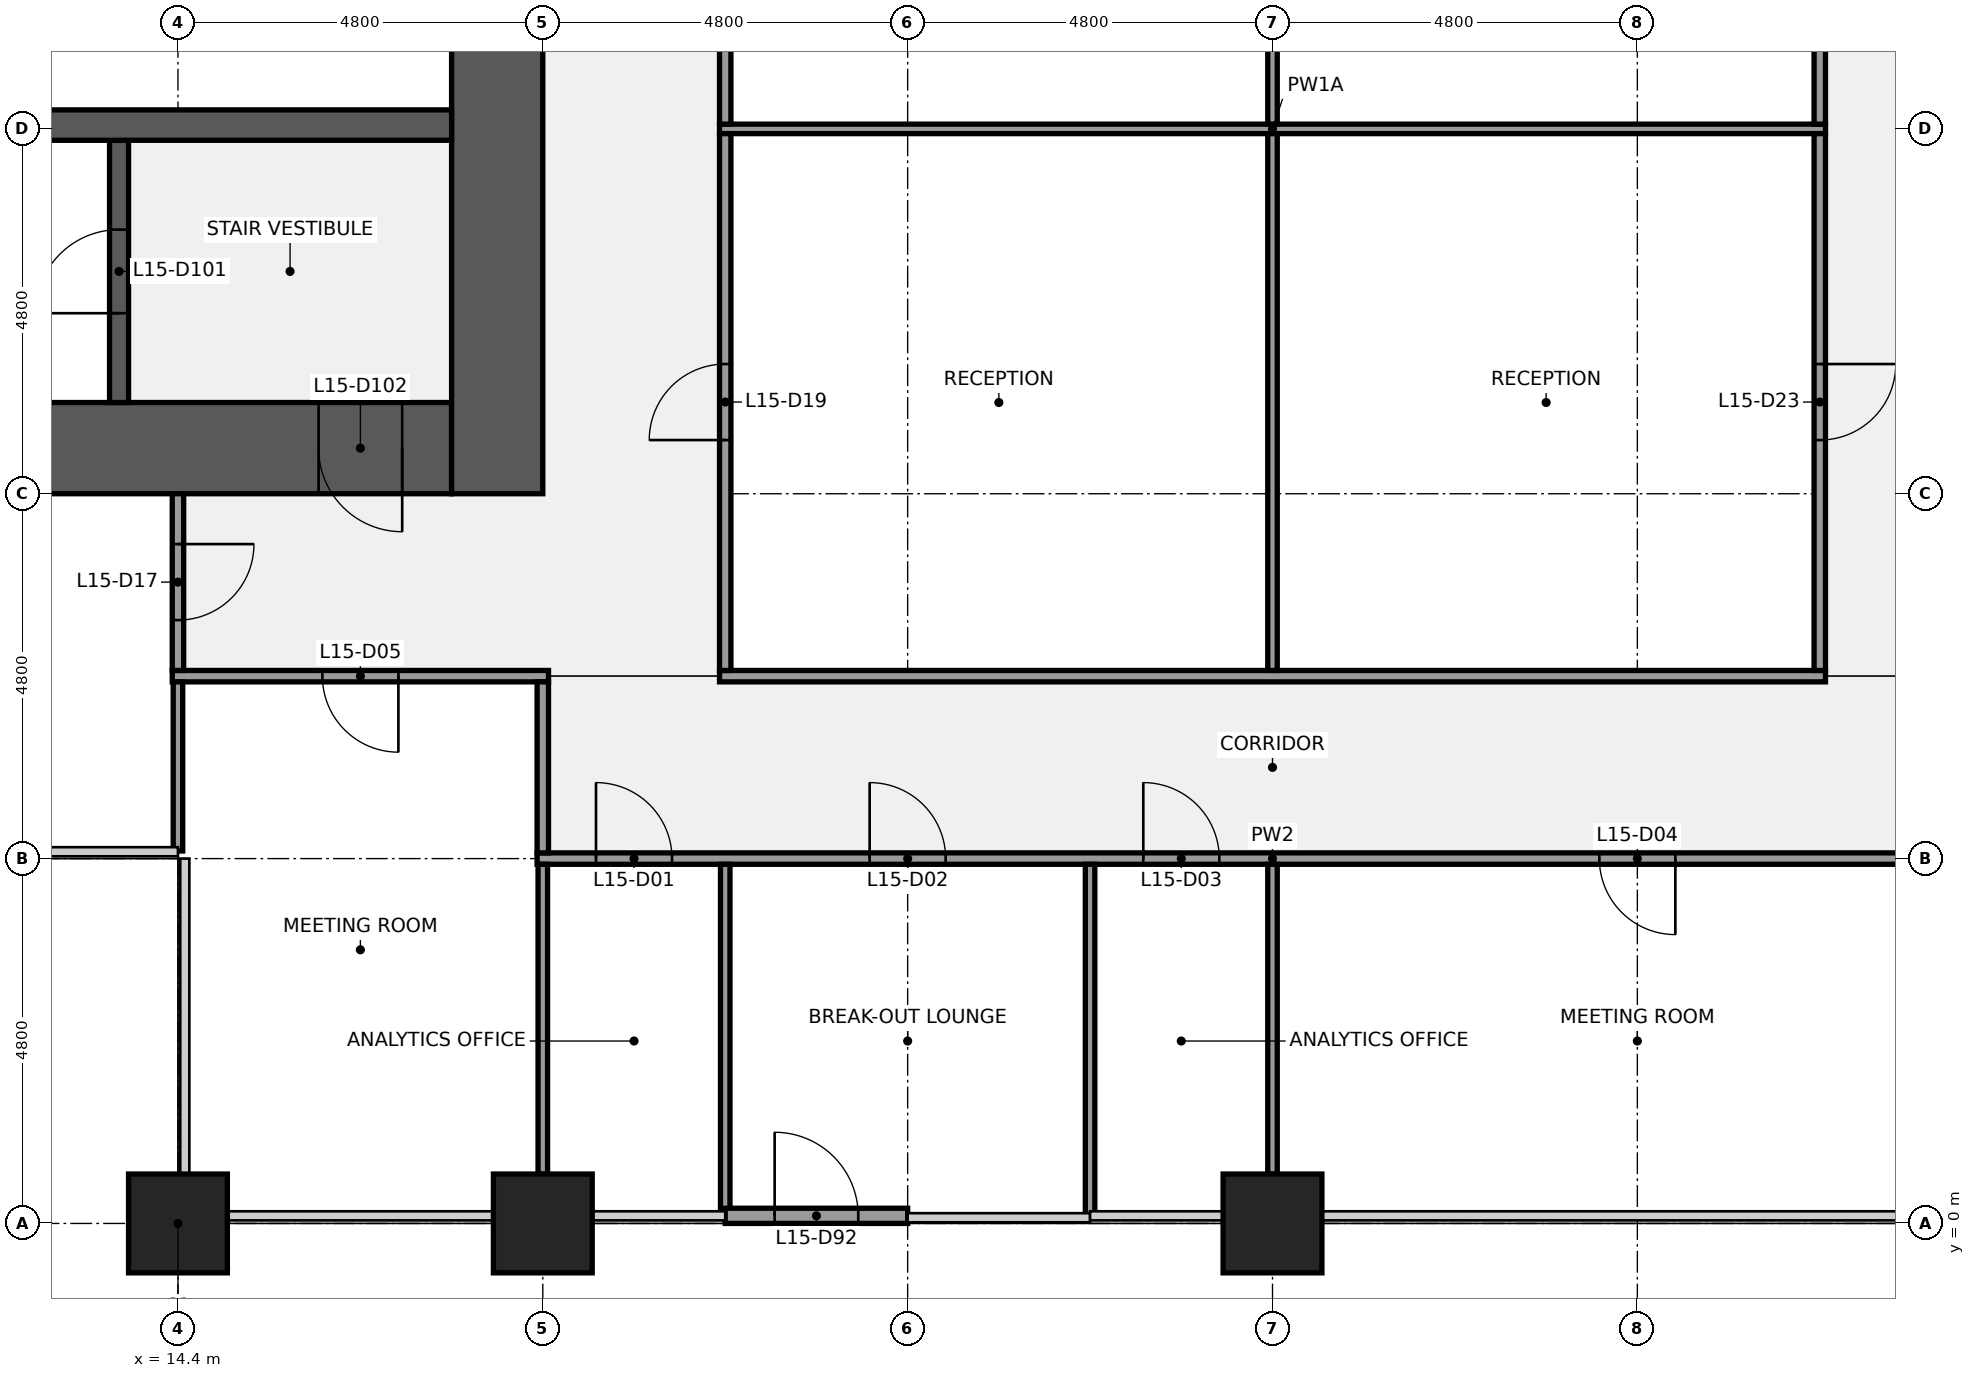
"""IFC4 building model, lengths in metres.
Left out: names, types, materials, properties, quantities, classifications, styles, units other than length and angle.
Written with IfcOpenShell. Run it as: python <this file> out.ifc"""

import sys

from ifc_helpers import new_model, si_unit, direction, frame, frame_2d, origin, origin_2d, place, context, subcontext, project, spatial, rectangle, extrude, element, fill, save


model = new_model("IFC4")
c1 = context("Model", 3, precision=1e-05, world=origin(), true_north=direction((0.0, 1.0)))
c2 = subcontext(c1, "Body", "Model", "MODEL_VIEW")
j1 = project(units=[si_unit("LENGTHUNIT", "METRE"), si_unit("PLANEANGLEUNIT", "RADIAN")], contexts=[c1])
p1 = place(None, origin())
s1 = spatial("IfcSite", under=j1, at=p1, CompositionType="ELEMENT")
p2 = place(p1, origin())
s2 = spatial("IfcBuilding", under=s1, at=p2, CompositionType="ELEMENT")
p3 = place(p2, frame((0.0, 0.0, 71.0)))
s3 = spatial("IfcBuildingStorey", under=s2, at=p3, CompositionType="ELEMENT", Elevation=71.0)
for number, where, z_axis, x_axis in (
    (1, (14.4, 0.0, 0.0), (0.0, 0.0, 1.0), (1.0, 0.0, 0.0)),
    (2, (19.2, 0.0, 0.0), (0.0, 0.0, 1.0), (1.0, 0.0, 0.0)),
    (3, (28.8, 0.0, 0.0), (0.0, 0.0, 1.0), (1.0, 0.0, 0.0)),
):
    element("IfcColumn", number, at=place(p3, frame(where, z_axis=z_axis, x_axis=x_axis)), inside=s3, PredefinedType="COLUMN", context=c2, shape_type="SweptSolid", body=[
        extrude(rectangle(XDim=1.3, YDim=1.3, at=origin_2d()), origin(), (0.0, 0.0, 1.0), 4.0),
    ])
p4 = place(p3, frame((18.0, 10.2, 0.0), z_axis=(0.0, 0.0, 1.0), x_axis=(-1.0, 0.0, 0.0)))
e4 = element("IfcWall", 4, at=p4, inside=s3, PredefinedType="SHEAR", context=c2, shape_type="SweptSolid", body=[
    extrude(rectangle(XDim=13.2, YDim=1.2, at=frame_2d((6.6, 0.0))), origin(), (0.0, 0.0, 1.0), 3.84),
])
p5 = place(p4, frame((0.65, 0.0, 0.0)))
e5 = element("IfcOpeningElement", 5, at=p5, cuts=e4, PredefinedType="OPENING", context=c2, shape_type="SweptSolid", body=[
    extrude(rectangle(XDim=1.1, YDim=2.1, at=frame_2d((0.55, 1.05))), frame((0.0, 0.61, 0.0), z_axis=(0.0, -1.0, 0.0), x_axis=(1.0, 0.0, 0.0)), (0.0, 0.0, 1.0), 1.22),
])
p6 = place(p3, frame((18.6, 38.4, 0.0), z_axis=(0.0, 0.0, 1.0), x_axis=(0.0, -1.0, 0.0)))
e6 = element("IfcWall", 6, at=p6, inside=s3, PredefinedType="SHEAR", context=c2, shape_type="SweptSolid", body=[
    extrude(rectangle(XDim=28.8, YDim=1.2, at=frame_2d((14.4, 0.0))), origin(), (0.0, 0.0, 1.0), 3.84),
])
p7 = place(p6, frame((18.3, 0.0, 0.0)))
e7 = element("IfcOpeningElement", 7, at=p7, cuts=e6, PredefinedType="OPENING", context=c2, shape_type="SweptSolid", body=[
    extrude(rectangle(XDim=1.8, YDim=2.1, at=frame_2d((0.9, 1.05))), frame((0.0, 0.61, 0.0), z_axis=(0.0, -1.0, 0.0), x_axis=(1.0, 0.0, 0.0)), (0.0, 0.0, 1.0), 1.22),
])
p8 = place(p6, frame((8.7, 0.0, 0.0)))
e8 = element("IfcOpeningElement", 8, at=p8, cuts=e6, PredefinedType="OPENING", context=c2, shape_type="SweptSolid", body=[
    extrude(rectangle(XDim=1.8, YDim=2.1, at=frame_2d((0.9, 1.05))), frame((0.0, 0.61, 0.0), z_axis=(0.0, -1.0, 0.0), x_axis=(1.0, 0.0, 0.0)), (0.0, 0.0, 1.0), 1.22),
])
p9 = place(p3, frame((13.625, 10.8, 0.0), z_axis=(0.0, 0.0, 1.0), x_axis=(0.0, 1.0, 0.0)))
e9 = element("IfcWall", 9, at=p9, inside=s3, PredefinedType="SHEAR", context=c2, shape_type="SweptSolid", body=[
    extrude(rectangle(XDim=3.45, YDim=0.25, at=frame_2d((1.725, 0.0))), origin(), (0.0, 0.0, 1.0), 3.84),
])
p10 = place(p9, frame((1.175, 0.0, 0.0)))
e10 = element("IfcOpeningElement", 10, at=p10, cuts=e9, PredefinedType="OPENING", context=c2, shape_type="SweptSolid", body=[
    extrude(rectangle(XDim=1.1, YDim=2.1, at=frame_2d((0.55, 1.05))), frame((0.0, 0.135, 0.0), z_axis=(0.0, -1.0, 0.0), x_axis=(1.0, 0.0, 0.0)), (0.0, 0.0, 1.0), 0.27),
])
p11 = place(p3, frame((1.2, 14.45, 0.0), z_axis=(0.0, 0.0, 1.0), x_axis=(1.0, 0.0, 0.0)))
e11 = element("IfcWall", 11, at=p11, inside=s3, PredefinedType="SHEAR", context=c2, shape_type="SweptSolid", body=[
    extrude(rectangle(XDim=16.8, YDim=0.4, at=frame_2d((8.4, 0.0))), origin(), (0.0, 0.0, 1.0), 3.84),
])
p12 = place(p3, frame((19.125, 4.8, 0.0), z_axis=(0.0, 0.0, 1.0), x_axis=(1.0, 0.0, 0.0)))
e12 = element("IfcWall", 12, at=p12, inside=s3, PredefinedType="PARTITIONING", context=c2, shape_type="SweptSolid", body=[
    extrude(rectangle(XDim=19.35, YDim=0.15, at=frame_2d((9.675, 0.0))), origin(), (0.0, 0.0, 1.0), 2.87),
])
p13 = place(p12, frame((0.775, 0.0, 0.0)))
e13 = element("IfcOpeningElement", 13, at=p13, cuts=e12, PredefinedType="OPENING", context=c2, shape_type="SweptSolid", body=[
    extrude(rectangle(XDim=1.0, YDim=2.1, at=frame_2d((0.5, 1.05))), frame((0.0, 0.085, 0.0), z_axis=(0.0, -1.0, 0.0), x_axis=(1.0, 0.0, 0.0)), (0.0, 0.0, 1.0), 0.17),
])
p14 = place(p12, frame((4.375, 0.0, 0.0)))
e14 = element("IfcOpeningElement", 14, at=p14, cuts=e12, PredefinedType="OPENING", context=c2, shape_type="SweptSolid", body=[
    extrude(rectangle(XDim=1.0, YDim=2.1, at=frame_2d((0.5, 1.05))), frame((0.0, 0.085, 0.0), z_axis=(0.0, -1.0, 0.0), x_axis=(1.0, 0.0, 0.0)), (0.0, 0.0, 1.0), 0.17),
])
p15 = place(p12, frame((7.975, 0.0, 0.0)))
e15 = element("IfcOpeningElement", 15, at=p15, cuts=e12, PredefinedType="OPENING", context=c2, shape_type="SweptSolid", body=[
    extrude(rectangle(XDim=1.0, YDim=2.1, at=frame_2d((0.5, 1.05))), frame((0.0, 0.085, 0.0), z_axis=(0.0, -1.0, 0.0), x_axis=(1.0, 0.0, 0.0)), (0.0, 0.0, 1.0), 0.17),
])
p16 = place(p12, frame((13.975, 0.0, 0.0)))
e16 = element("IfcOpeningElement", 16, at=p16, cuts=e12, PredefinedType="OPENING", context=c2, shape_type="SweptSolid", body=[
    extrude(rectangle(XDim=1.0, YDim=2.1, at=frame_2d((0.5, 1.05))), frame((0.0, 0.085, 0.0), z_axis=(0.0, -1.0, 0.0), x_axis=(1.0, 0.0, 0.0)), (0.0, 0.0, 1.0), 0.17),
])
p17 = place(p3, frame((14.325, 7.2, 0.0), z_axis=(0.0, 0.0, 1.0), x_axis=(1.0, 0.0, 0.0)))
e17 = element("IfcWall", 17, at=p17, inside=s3, PredefinedType="PARTITIONING", context=c2, shape_type="SweptSolid", body=[
    extrude(rectangle(XDim=4.95, YDim=0.15, at=frame_2d((2.475, 0.0))), origin(), (0.0, 0.0, 1.0), 2.87),
])
p18 = place(p17, frame((1.975, 0.0, 0.0)))
e18 = element("IfcOpeningElement", 18, at=p18, cuts=e17, PredefinedType="OPENING", context=c2, shape_type="SweptSolid", body=[
    extrude(rectangle(XDim=1.0, YDim=2.1, at=frame_2d((0.5, 1.05))), frame((0.0, 0.085, 0.0), z_axis=(0.0, -1.0, 0.0), x_axis=(1.0, 0.0, 0.0)), (0.0, 0.0, 1.0), 0.17),
])
p19 = place(p3, frame((21.525, 7.2, 0.0), z_axis=(0.0, 0.0, 1.0), x_axis=(1.0, 0.0, 0.0)))
e19 = element("IfcWall", 19, at=p19, inside=s3, PredefinedType="PARTITIONING", context=c2, shape_type="SweptSolid", body=[
    extrude(rectangle(XDim=14.55, YDim=0.15, at=frame_2d((7.275, 0.0))), origin(), (0.0, 0.0, 1.0), 2.87),
])
p20 = place(p3, frame((21.525, 14.4, 0.0), z_axis=(0.0, 0.0, 1.0), x_axis=(1.0, 0.0, 0.0)))
e20 = element("IfcWall", 20, at=p20, inside=s3, PredefinedType="PARTITIONING", context=c2, shape_type="SweptSolid", body=[
    extrude(rectangle(XDim=14.55, YDim=0.125, at=frame_2d((7.275, 0.0))), origin(), (0.0, 0.0, 1.0), 2.87),
])
p21 = place(p3, frame((14.4, 4.9, 0.0), z_axis=(0.0, 0.0, 1.0), x_axis=(0.0, 1.0, 0.0)))
e21 = element("IfcWall", 21, at=p21, inside=s3, PredefinedType="PARTITIONING", context=c2, shape_type="SweptSolid", body=[
    extrude(rectangle(XDim=2.225, YDim=0.125, at=frame_2d((1.113, 0.0))), origin(), (0.0, 0.0, 1.0), 2.87),
])
p22 = place(p3, frame((14.4, 7.275, 0.0), z_axis=(0.0, 0.0, 1.0), x_axis=(0.0, 1.0, 0.0)))
e22 = element("IfcWall", 22, at=p22, inside=s3, PredefinedType="PARTITIONING", context=c2, shape_type="SweptSolid", body=[
    extrude(rectangle(XDim=2.325, YDim=0.15, at=frame_2d((1.163, 0.0))), origin(), (0.0, 0.0, 1.0), 2.87),
])
p23 = place(p22, frame((0.663, 0.0, 0.0)))
e23 = element("IfcOpeningElement", 23, at=p23, cuts=e22, PredefinedType="OPENING", context=c2, shape_type="SweptSolid", body=[
    extrude(rectangle(XDim=1.0, YDim=2.1, at=frame_2d((0.5, 1.05))), frame((0.0, 0.085, 0.0), z_axis=(0.0, -1.0, 0.0), x_axis=(1.0, 0.0, 0.0)), (0.0, 0.0, 1.0), 0.17),
])
p24 = place(p3, frame((19.2, 0.65, 0.0), z_axis=(0.0, 0.0, 1.0), x_axis=(0.0, 1.0, 0.0)))
e24 = element("IfcWall", 24, at=p24, inside=s3, PredefinedType="PARTITIONING", context=c2, shape_type="SweptSolid", body=[
    extrude(rectangle(XDim=4.075, YDim=0.125, at=frame_2d((2.038, 0.0))), origin(), (0.0, 0.0, 1.0), 2.87),
])
p25 = place(p3, frame((19.2, 4.875, 0.0), z_axis=(0.0, 0.0, 1.0), x_axis=(0.0, 1.0, 0.0)))
e25 = element("IfcWall", 25, at=p25, inside=s3, PredefinedType="PARTITIONING", context=c2, shape_type="SweptSolid", body=[
    extrude(rectangle(XDim=2.25, YDim=0.15, at=frame_2d((1.125, 0.0))), origin(), (0.0, 0.0, 1.0), 2.87),
])
p26 = place(p3, frame((21.6, 0.1, 0.0), z_axis=(0.0, 0.0, 1.0), x_axis=(0.0, 1.0, 0.0)))
e26 = element("IfcWall", 26, at=p26, inside=s3, PredefinedType="PARTITIONING", context=c2, shape_type="SweptSolid", body=[
    extrude(rectangle(XDim=4.625, YDim=0.125, at=frame_2d((2.312, 0.0))), origin(), (0.0, 0.0, 1.0), 2.87),
])
p27 = place(p3, frame((21.6, 7.275, 0.0), z_axis=(0.0, 0.0, 1.0), x_axis=(0.0, 1.0, 0.0)))
e27 = element("IfcWall", 27, at=p27, inside=s3, PredefinedType="PARTITIONING", context=c2, shape_type="SweptSolid", body=[
    extrude(rectangle(XDim=7.062, YDim=0.15, at=frame_2d((3.531, 0.0))), origin(), (0.0, 0.0, 1.0), 2.87),
])
p28 = place(p27, frame((3.031, 0.0, 0.0)))
e28 = element("IfcOpeningElement", 28, at=p28, cuts=e27, PredefinedType="OPENING", context=c2, shape_type="SweptSolid", body=[
    extrude(rectangle(XDim=1.0, YDim=2.1, at=frame_2d((0.5, 1.05))), frame((0.0, 0.085, 0.0), z_axis=(0.0, -1.0, 0.0), x_axis=(1.0, 0.0, 0.0)), (0.0, 0.0, 1.0), 0.17),
])
p29 = place(p3, frame((21.6, 14.462, 0.0), z_axis=(0.0, 0.0, 1.0), x_axis=(0.0, 1.0, 0.0)))
e29 = element("IfcWall", 29, at=p29, inside=s3, PredefinedType="PARTITIONING", context=c2, shape_type="SweptSolid", body=[
    extrude(rectangle(XDim=7.075, YDim=0.15, at=frame_2d((3.538, 0.0))), origin(), (0.0, 0.0, 1.0), 2.87),
])
p30 = place(p29, frame((3.038, 0.0, 0.0)))
e30 = element("IfcOpeningElement", 30, at=p30, cuts=e29, PredefinedType="OPENING", context=c2, shape_type="SweptSolid", body=[
    extrude(rectangle(XDim=1.0, YDim=2.1, at=frame_2d((0.5, 1.05))), frame((0.0, 0.085, 0.0), z_axis=(0.0, -1.0, 0.0), x_axis=(1.0, 0.0, 0.0)), (0.0, 0.0, 1.0), 0.17),
])
p31 = place(p3, frame((26.4, 0.1, 0.0), z_axis=(0.0, 0.0, 1.0), x_axis=(0.0, 1.0, 0.0)))
e31 = element("IfcWall", 31, at=p31, inside=s3, PredefinedType="PARTITIONING", context=c2, shape_type="SweptSolid", body=[
    extrude(rectangle(XDim=4.625, YDim=0.125, at=frame_2d((2.312, 0.0))), origin(), (0.0, 0.0, 1.0), 2.87),
])
p32 = place(p3, frame((28.8, 0.65, 0.0), z_axis=(0.0, 0.0, 1.0), x_axis=(0.0, 1.0, 0.0)))
e32 = element("IfcWall", 32, at=p32, inside=s3, PredefinedType="PARTITIONING", context=c2, shape_type="SweptSolid", body=[
    extrude(rectangle(XDim=4.075, YDim=0.125, at=frame_2d((2.038, 0.0))), origin(), (0.0, 0.0, 1.0), 2.87),
])
p33 = place(p3, frame((28.8, 7.275, 0.0), z_axis=(0.0, 0.0, 1.0), x_axis=(0.0, 1.0, 0.0)))
e33 = element("IfcWall", 33, at=p33, inside=s3, PredefinedType="PARTITIONING", context=c2, shape_type="SweptSolid", body=[
    extrude(rectangle(XDim=7.062, YDim=0.125, at=frame_2d((3.531, 0.0))), origin(), (0.0, 0.0, 1.0), 2.87),
])
p34 = place(p3, frame((28.8, 14.462, 0.0), z_axis=(0.0, 0.0, 1.0), x_axis=(0.0, 1.0, 0.0)))
e34 = element("IfcWall", 34, at=p34, inside=s3, PredefinedType="PARTITIONING", context=c2, shape_type="SweptSolid", body=[
    extrude(rectangle(XDim=7.075, YDim=0.125, at=frame_2d((3.538, 0.0))), origin(), (0.0, 0.0, 1.0), 2.87),
])
p35 = place(p3, frame((36.0, 7.275, 0.0), z_axis=(0.0, 0.0, 1.0), x_axis=(0.0, 1.0, 0.0)))
e35 = element("IfcWall", 35, at=p35, inside=s3, PredefinedType="PARTITIONING", context=c2, shape_type="SweptSolid", body=[
    extrude(rectangle(XDim=7.062, YDim=0.15, at=frame_2d((3.531, 0.0))), origin(), (0.0, 0.0, 1.0), 2.87),
])
p36 = place(p35, frame((3.031, 0.0, 0.0)))
e36 = element("IfcOpeningElement", 36, at=p36, cuts=e35, PredefinedType="OPENING", context=c2, shape_type="SweptSolid", body=[
    extrude(rectangle(XDim=1.0, YDim=2.1, at=frame_2d((0.5, 1.05))), frame((0.0, 0.085, 0.0), z_axis=(0.0, -1.0, 0.0), x_axis=(1.0, 0.0, 0.0)), (0.0, 0.0, 1.0), 0.17),
])
p37 = place(p3, frame((36.0, 14.462, 0.0), z_axis=(0.0, 0.0, 1.0), x_axis=(0.0, 1.0, 0.0)))
e37 = element("IfcWall", 37, at=p37, inside=s3, PredefinedType="PARTITIONING", context=c2, shape_type="SweptSolid", body=[
    extrude(rectangle(XDim=7.075, YDim=0.15, at=frame_2d((3.538, 0.0))), origin(), (0.0, 0.0, 1.0), 2.87),
])
p38 = place(p37, frame((3.038, 0.0, 0.0)))
e38 = element("IfcOpeningElement", 38, at=p38, cuts=e37, PredefinedType="OPENING", context=c2, shape_type="SweptSolid", body=[
    extrude(rectangle(XDim=1.0, YDim=2.1, at=frame_2d((0.5, 1.05))), frame((0.0, 0.085, 0.0), z_axis=(0.0, -1.0, 0.0), x_axis=(1.0, 0.0, 0.0)), (0.0, 0.0, 1.0), 0.17),
])
p39 = place(p3, frame((21.6, 0.1, 0.0), z_axis=(0.0, 0.0, 1.0), x_axis=(1.0, 0.0, 0.0)))
e39 = element("IfcWall", 39, at=p39, inside=s3, PredefinedType="SOLIDWALL", context=c2, shape_type="SweptSolid", body=[
    extrude(rectangle(XDim=2.4, YDim=0.2, at=frame_2d((1.2, 0.0))), origin(), (0.0, 0.0, 1.0), 3.314),
])
p40 = place(p39, frame((0.65, 0.0, 0.0)))
e40 = element("IfcOpeningElement", 40, at=p40, cuts=e39, PredefinedType="OPENING", context=c2, shape_type="SweptSolid", body=[
    extrude(rectangle(XDim=1.1, YDim=2.1, at=frame_2d((0.55, 1.05))), frame((0.0, 0.11, 0.0), z_axis=(0.0, -1.0, 0.0), x_axis=(1.0, 0.0, 0.0)), (0.0, 0.0, 1.0), 0.22),
])
for number, where, z_axis, x_axis in (
    (41, (14.4, -1.075, 0.0), (0.0, 0.0, 1.0), (1.0, 0.0, 0.0)),
    (42, (19.2, -1.075, 0.0), (0.0, 0.0, 1.0), (1.0, 0.0, 0.0)),
    (43, (38.4, -1.075, 0.0), (0.0, 0.0, 1.0), (1.0, 0.0, 0.0)),
):
    element("IfcColumn", number, at=place(p3, frame(where, z_axis=z_axis, x_axis=x_axis)), inside=s3, PredefinedType="PILASTER", context=c2, shape_type="SweptSolid", body=[
        extrude(rectangle(XDim=4.2, YDim=0.85, at=origin_2d()), origin(), (0.0, 0.0, 1.0), 4.0),
    ])
p41 = place(p10, origin())
e44 = element("IfcDoor", 44, at=p41, inside=s3, OperationType="SINGLE_SWING_LEFT", PredefinedType="DOOR", context=c2, shape_type="SweptSolid", body=[
    extrude(rectangle(XDim=1.1, YDim=2.1, at=frame_2d((0.55, 1.05))), frame((0.0, 0.025, 0.0), z_axis=(0.0, -1.0, 0.0), x_axis=(1.0, 0.0, 0.0)), (0.0, 0.0, 1.0), 0.05),
])
fill(e10, e44)
p42 = place(p5, origin())
e45 = element("IfcDoor", 45, at=p42, inside=s3, OperationType="SINGLE_SWING_LEFT", PredefinedType="DOOR", context=c2, shape_type="SweptSolid", body=[
    extrude(rectangle(XDim=1.1, YDim=2.1, at=frame_2d((0.55, 1.05))), frame((0.0, 0.025, 0.0), z_axis=(0.0, -1.0, 0.0), x_axis=(1.0, 0.0, 0.0)), (0.0, 0.0, 1.0), 0.05),
])
fill(e5, e45)
p43 = place(p13, origin())
e46 = element("IfcDoor", 46, at=p43, inside=s3, OperationType="SINGLE_SWING_LEFT", PredefinedType="DOOR", context=c2, shape_type="SweptSolid", body=[
    extrude(rectangle(XDim=1.0, YDim=2.1, at=frame_2d((0.5, 1.05))), frame((0.0, 0.025, 0.0), z_axis=(0.0, -1.0, 0.0), x_axis=(1.0, 0.0, 0.0)), (0.0, 0.0, 1.0), 0.05),
])
fill(e13, e46)
p44 = place(p14, origin())
e47 = element("IfcDoor", 47, at=p44, inside=s3, OperationType="SINGLE_SWING_LEFT", PredefinedType="DOOR", context=c2, shape_type="SweptSolid", body=[
    extrude(rectangle(XDim=1.0, YDim=2.1, at=frame_2d((0.5, 1.05))), frame((0.0, 0.025, 0.0), z_axis=(0.0, -1.0, 0.0), x_axis=(1.0, 0.0, 0.0)), (0.0, 0.0, 1.0), 0.05),
])
fill(e14, e47)
p45 = place(p15, origin())
e48 = element("IfcDoor", 48, at=p45, inside=s3, OperationType="SINGLE_SWING_LEFT", PredefinedType="DOOR", context=c2, shape_type="SweptSolid", body=[
    extrude(rectangle(XDim=1.0, YDim=2.1, at=frame_2d((0.5, 1.05))), frame((0.0, 0.025, 0.0), z_axis=(0.0, -1.0, 0.0), x_axis=(1.0, 0.0, 0.0)), (0.0, 0.0, 1.0), 0.05),
])
fill(e15, e48)
p46 = place(p16, origin())
e49 = element("IfcDoor", 49, at=p46, inside=s3, OperationType="SINGLE_SWING_RIGHT", PredefinedType="DOOR", context=c2, shape_type="SweptSolid", body=[
    extrude(rectangle(XDim=1.0, YDim=2.1, at=frame_2d((0.5, 1.05))), frame((0.0, 0.025, 0.0), z_axis=(0.0, -1.0, 0.0), x_axis=(1.0, 0.0, 0.0)), (0.0, 0.0, 1.0), 0.05),
])
fill(e16, e49)
p47 = place(p18, origin())
e50 = element("IfcDoor", 50, at=p47, inside=s3, OperationType="SINGLE_SWING_RIGHT", PredefinedType="DOOR", context=c2, shape_type="SweptSolid", body=[
    extrude(rectangle(XDim=1.0, YDim=2.1, at=frame_2d((0.5, 1.05))), frame((0.0, 0.025, 0.0), z_axis=(0.0, -1.0, 0.0), x_axis=(1.0, 0.0, 0.0)), (0.0, 0.0, 1.0), 0.05),
])
fill(e18, e50)
p48 = place(p23, origin())
e51 = element("IfcDoor", 51, at=p48, inside=s3, OperationType="SINGLE_SWING_RIGHT", PredefinedType="DOOR", context=c2, shape_type="SweptSolid", body=[
    extrude(rectangle(XDim=1.0, YDim=2.1, at=frame_2d((0.5, 1.05))), frame((0.0, 0.025, 0.0), z_axis=(0.0, -1.0, 0.0), x_axis=(1.0, 0.0, 0.0)), (0.0, 0.0, 1.0), 0.05),
])
fill(e23, e51)
p49 = place(p28, origin())
e52 = element("IfcDoor", 52, at=p49, inside=s3, OperationType="SINGLE_SWING_LEFT", PredefinedType="DOOR", context=c2, shape_type="SweptSolid", body=[
    extrude(rectangle(XDim=1.0, YDim=2.1, at=frame_2d((0.5, 1.05))), frame((0.0, 0.025, 0.0), z_axis=(0.0, -1.0, 0.0), x_axis=(1.0, 0.0, 0.0)), (0.0, 0.0, 1.0), 0.05),
])
fill(e28, e52)
p50 = place(p36, origin())
e53 = element("IfcDoor", 53, at=p50, inside=s3, OperationType="SINGLE_SWING_RIGHT", PredefinedType="DOOR", context=c2, shape_type="SweptSolid", body=[
    extrude(rectangle(XDim=1.0, YDim=2.1, at=frame_2d((0.5, 1.05))), frame((0.0, 0.025, 0.0), z_axis=(0.0, -1.0, 0.0), x_axis=(1.0, 0.0, 0.0)), (0.0, 0.0, 1.0), 0.05),
])
fill(e36, e53)
p51 = place(p40, origin())
e54 = element("IfcDoor", 54, at=p51, inside=s3, OperationType="SINGLE_SWING_LEFT", PredefinedType="DOOR", context=c2, shape_type="SweptSolid", body=[
    extrude(rectangle(XDim=1.1, YDim=2.1, at=frame_2d((0.55, 1.05))), frame((0.0, 0.025, 0.0), z_axis=(0.0, -1.0, 0.0), x_axis=(1.0, 0.0, 0.0)), (0.0, 0.0, 1.0), 0.05),
])
fill(e40, e54)
save(model, sys.argv[1])
